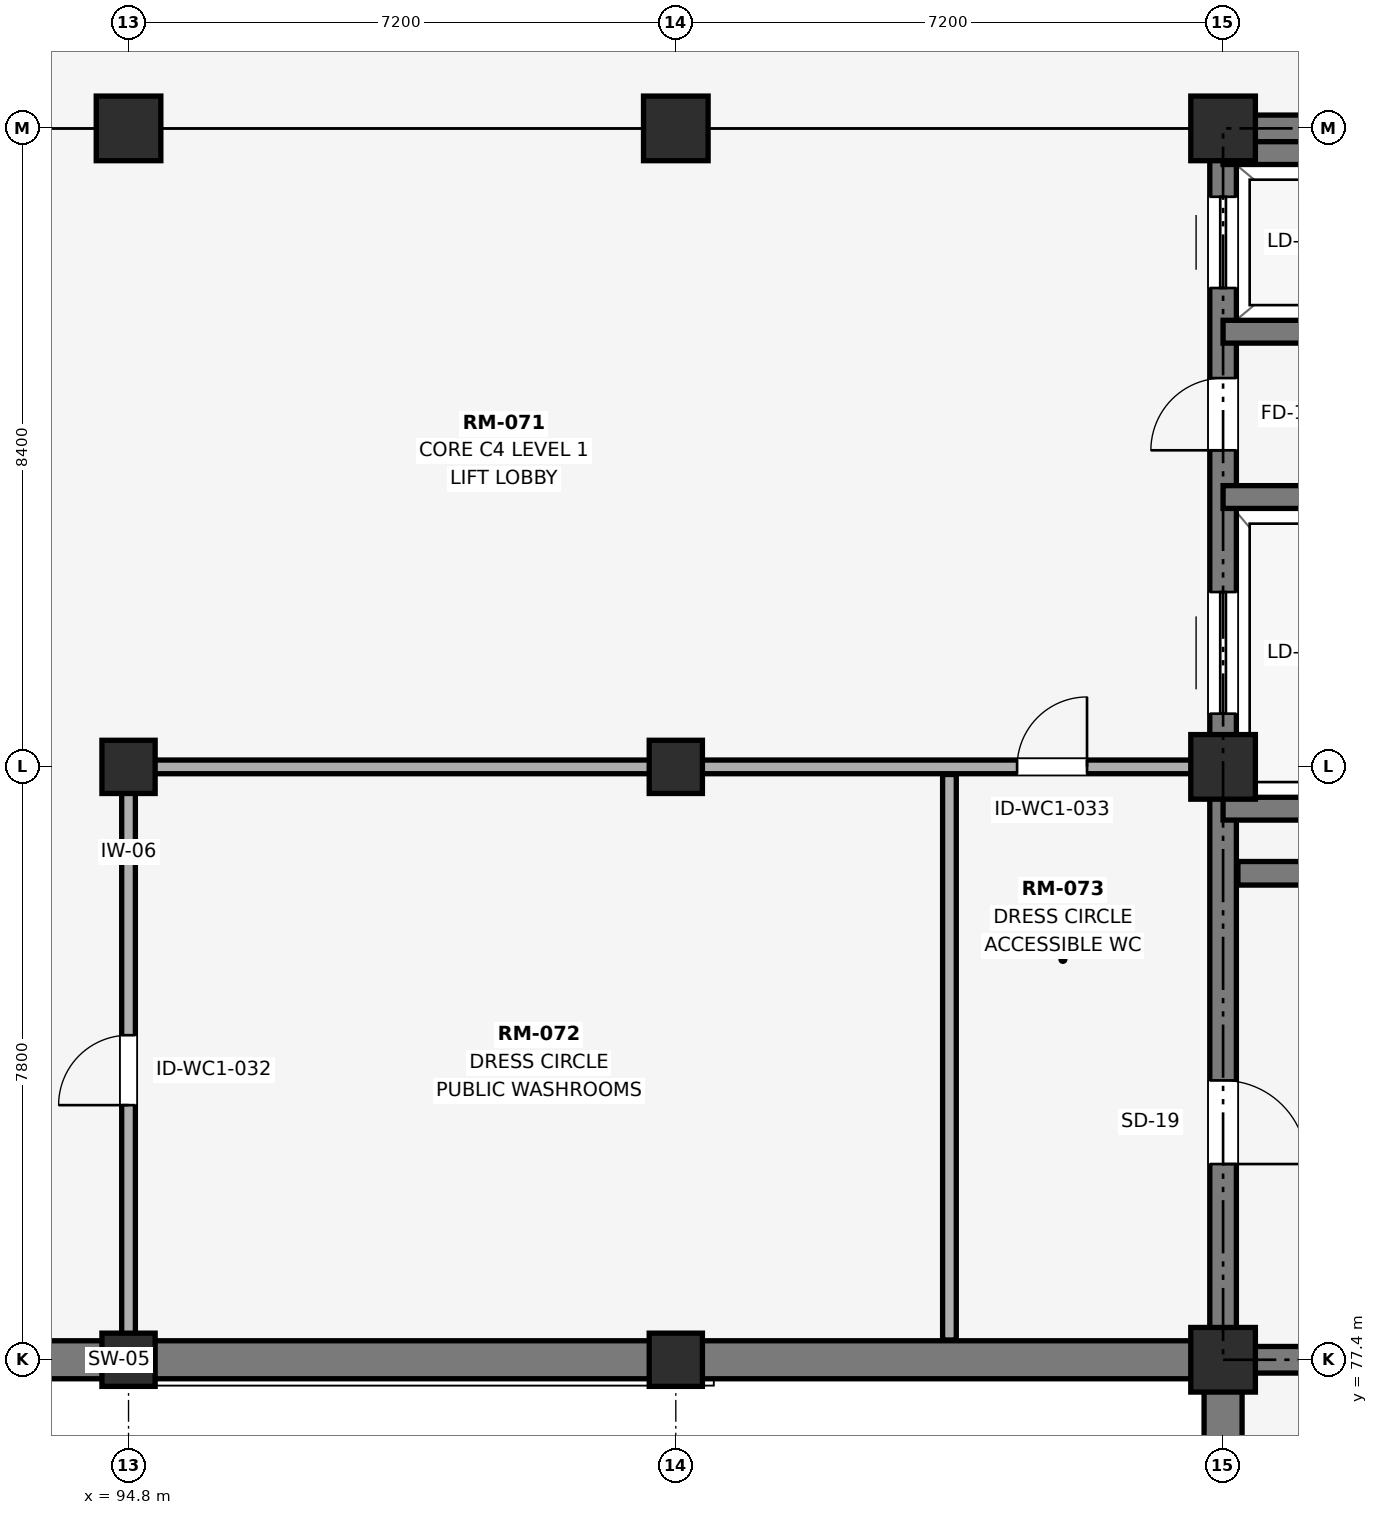
"""IFC4 building model, lengths in metres.
Left out: names, types, materials, properties, quantities, classifications, styles, units other than length and angle.
Written with IfcOpenShell. Run it as: python <this file> out.ifc"""

import sys

from ifc_helpers import new_model, si_unit, direction, frame, frame_2d, origin, origin_2d, place, context, subcontext, project, spatial, rectangle, extrude, element, fill, save


model = new_model("IFC4")
c1 = context("Model", 3, precision=1e-05, world=origin(), true_north=direction((0.0, 1.0)))
c2 = subcontext(c1, "Body", "Model", "MODEL_VIEW")
j1 = project(units=[si_unit("LENGTHUNIT", "METRE"), si_unit("PLANEANGLEUNIT", "RADIAN")], contexts=[c1])
p1 = place(None, origin())
s1 = spatial("IfcSite", under=j1, at=p1, CompositionType="ELEMENT")
p2 = place(p1, origin())
s2 = spatial("IfcBuilding", under=s1, at=p2, CompositionType="ELEMENT")
p3 = place(p2, frame((0.0, 0.0, 5.4)))
s3 = spatial("IfcBuildingStorey", under=s2, at=p3, CompositionType="ELEMENT", Elevation=5.4)
for number, where, z_axis, x_axis in (
    (1, (94.8, 77.4, 0.0), (0.0, 0.0, 1.0), (1.0, 0.0, 0.0)),
    (2, (94.8, 85.2, 0.0), (0.0, 0.0, 1.0), (1.0, 0.0, 0.0)),
):
    element("IfcColumn", number, at=place(p3, frame(where, z_axis=z_axis, x_axis=x_axis)), inside=s3, PredefinedType="COLUMN", context=c2, shape_type="SweptSolid", body=[
        extrude(rectangle(XDim=0.7, YDim=0.7, at=origin_2d()), origin(), (0.0, 0.0, 1.0), 4.8),
    ])
p4 = place(p3, frame((94.8, 93.6, 0.0), z_axis=(0.0, 0.0, 1.0), x_axis=(1.0, 0.0, 0.0)))
e3 = element("IfcColumn", 3, at=p4, inside=s3, PredefinedType="COLUMN", context=c2, shape_type="SweptSolid", body=[
    extrude(rectangle(XDim=0.85, YDim=0.85, at=origin_2d()), origin(), (0.0, 0.0, 1.0), 4.8),
])
for number, where, z_axis, x_axis in (
    (4, (102.0, 77.4, 0.0), (0.0, 0.0, 1.0), (1.0, 0.0, 0.0)),
    (5, (102.0, 85.2, 0.0), (0.0, 0.0, 1.0), (1.0, 0.0, 0.0)),
):
    element("IfcColumn", number, at=place(p3, frame(where, z_axis=z_axis, x_axis=x_axis)), inside=s3, PredefinedType="COLUMN", context=c2, shape_type="SweptSolid", body=[
        extrude(rectangle(XDim=0.7, YDim=0.7, at=origin_2d()), origin(), (0.0, 0.0, 1.0), 4.8),
    ])
for number, where, z_axis, x_axis in (
    (6, (102.0, 93.6, 0.0), (0.0, 0.0, 1.0), (1.0, 0.0, 0.0)),
    (7, (109.2, 77.4, 0.0), (0.0, 0.0, 1.0), (1.0, 0.0, 0.0)),
    (8, (109.2, 85.2, 0.0), (0.0, 0.0, 1.0), (1.0, 0.0, 0.0)),
    (9, (109.2, 93.6, 0.0), (0.0, 0.0, 1.0), (1.0, 0.0, 0.0)),
):
    element("IfcColumn", number, at=place(p3, frame(where, z_axis=z_axis, x_axis=x_axis)), inside=s3, PredefinedType="COLUMN", context=c2, shape_type="SweptSolid", body=[
        extrude(rectangle(XDim=0.85, YDim=0.85, at=origin_2d()), origin(), (0.0, 0.0, 1.0), 4.8),
    ])
p5 = place(p3, frame((58.59, 77.4, 0.0), z_axis=(0.0, 0.0, 1.0), x_axis=(1.0, 0.0, 0.0)))
e10 = element("IfcWall", 10, at=p5, inside=s3, PredefinedType="SOLIDWALL", context=c2, shape_type="SweptSolid", body=[
    extrude(rectangle(XDim=50.82, YDim=0.5, at=frame_2d((25.41, 0.0))), origin(), (0.0, 0.0, 1.0), 4.8),
])
p6 = place(p5, frame((17.0, 0.0, 0.0)))
e11 = element("IfcOpeningElement", 11, at=p6, cuts=e10, PredefinedType="OPENING", context=c2, shape_type="SweptSolid", body=[
    extrude(rectangle(XDim=2.0, YDim=2.45, at=frame_2d((1.0, 1.225))), frame((0.0, 0.26, 0.0), z_axis=(0.0, -1.0, 0.0), x_axis=(1.0, 0.0, 0.0)), (0.0, 0.0, 1.0), 0.52),
])
p7 = place(p3, frame((109.2, 46.41, 0.0), z_axis=(0.0, 0.0, 1.0), x_axis=(0.0, 1.0, 0.0)))
e12 = element("IfcWall", 12, at=p7, inside=s3, PredefinedType="SOLIDWALL", context=c2, shape_type="SweptSolid", body=[
    extrude(rectangle(XDim=30.78, YDim=0.5, at=frame_2d((15.39, 0.0))), origin(), (0.0, 0.0, 1.0), 4.8),
])
p8 = place(p3, frame((109.52, 77.4, 0.0), z_axis=(0.0, 0.0, 1.0), x_axis=(1.0, 0.0, 0.0)))
e13 = element("IfcWall", 13, at=p8, inside=s3, PredefinedType="SHEAR", context=c2, shape_type="SweptSolid", body=[
    extrude(rectangle(XDim=9.455, YDim=0.35, at=frame_2d((4.728, 0.0))), origin(), (0.0, 0.0, 1.0), 4.8),
])
p9 = place(p3, frame((109.025, 93.6, 0.0), z_axis=(0.0, 0.0, 1.0), x_axis=(1.0, 0.0, 0.0)))
e14 = element("IfcWall", 14, at=p9, inside=s3, PredefinedType="SHEAR", context=c2, shape_type="SweptSolid", body=[
    extrude(rectangle(XDim=9.95, YDim=0.35, at=frame_2d((4.975, 0.0))), origin(), (0.0, 0.0, 1.0), 4.8),
])
p10 = place(p3, frame((109.2, 77.575, 0.0), z_axis=(0.0, 0.0, 1.0), x_axis=(0.0, 1.0, 0.0)))
e15 = element("IfcWall", 15, at=p10, inside=s3, PredefinedType="SHEAR", context=c2, shape_type="SweptSolid", body=[
    extrude(rectangle(XDim=15.85, YDim=0.35, at=frame_2d((7.925, 0.0))), origin(), (0.0, 0.0, 1.0), 4.8),
])
p11 = place(p10, frame((8.325, 0.0, 0.0)))
e16 = element("IfcOpeningElement", 16, at=p11, cuts=e15, PredefinedType="OPENING", context=c2, shape_type="SweptSolid", body=[
    extrude(rectangle(XDim=1.6, YDim=2.4, at=frame_2d((0.8, 1.2))), frame((0.0, 0.185, 0.0), z_axis=(0.0, -1.0, 0.0), x_axis=(1.0, 0.0, 0.0)), (0.0, 0.0, 1.0), 0.37),
])
p12 = place(p10, frame((13.925, 0.0, 0.0)))
e17 = element("IfcOpeningElement", 17, at=p12, cuts=e15, PredefinedType="OPENING", context=c2, shape_type="SweptSolid", body=[
    extrude(rectangle(XDim=1.2, YDim=2.2, at=frame_2d((0.6, 1.1))), frame((0.0, 0.185, 0.0), z_axis=(0.0, -1.0, 0.0), x_axis=(1.0, 0.0, 0.0)), (0.0, 0.0, 1.0), 0.37),
])
p13 = place(p10, frame((11.79, 0.0, 0.0)))
e18 = element("IfcOpeningElement", 18, at=p13, cuts=e15, PredefinedType="OPENING", context=c2, shape_type="SweptSolid", body=[
    extrude(rectangle(XDim=0.95, YDim=2.1, at=frame_2d((0.475, 1.05))), frame((0.0, 0.185, 0.0), z_axis=(0.0, -1.0, 0.0), x_axis=(1.0, 0.0, 0.0)), (0.0, 0.0, 1.0), 0.37),
])
p14 = place(p10, frame((2.4, 0.0, 0.0)))
e19 = element("IfcOpeningElement", 19, at=p14, cuts=e15, PredefinedType="OPENING", context=c2, shape_type="SweptSolid", body=[
    extrude(rectangle(XDim=1.1, YDim=2.2, at=frame_2d((0.55, 1.1))), frame((0.0, 0.185, 0.0), z_axis=(0.0, -1.0, 0.0), x_axis=(1.0, 0.0, 0.0)), (0.0, 0.0, 1.0), 0.37),
])
p15 = place(p3, frame((109.395, 83.8, 0.0), z_axis=(0.0, 0.0, 1.0), x_axis=(1.0, 0.0, 0.0)))
e20 = element("IfcWall", 20, at=p15, inside=s3, PredefinedType="SHEAR", context=c2, shape_type="SweptSolid", body=[
    extrude(rectangle(XDim=9.21, YDim=0.31, at=frame_2d((4.605, 0.0))), origin(), (0.0, 0.0, 1.0), 4.8),
])
for number, where, z_axis, x_axis in (
    (21, (109.2, 84.65, 0.0), (0.0, 0.0, 1.0), (1.0, 0.0, 0.0)),
    (22, (109.2, 88.75, 0.0), (0.0, 0.0, 1.0), (1.0, 0.0, 0.0)),
):
    element("IfcWall", number, at=place(p3, frame(where, z_axis=z_axis, x_axis=x_axis)), inside=s3, PredefinedType="SHEAR", context=c2, shape_type="SweptSolid", body=[
        extrude(rectangle(XDim=3.5, YDim=0.3, at=frame_2d((1.75, 0.0))), origin(), (0.0, 0.0, 1.0), 4.8),
    ])
for number, where, z_axis, x_axis in (
    (23, (109.2, 90.925, 0.0), (0.0, 0.0, 1.0), (1.0, 0.0, 0.0)),
    (24, (109.2, 93.275, 0.0), (0.0, 0.0, 1.0), (1.0, 0.0, 0.0)),
):
    element("IfcWall", number, at=place(p3, frame(where, z_axis=z_axis, x_axis=x_axis)), inside=s3, PredefinedType="SHEAR", context=c2, shape_type="SweptSolid", body=[
        extrude(rectangle(XDim=2.8, YDim=0.3, at=frame_2d((1.4, 0.0))), origin(), (0.0, 0.0, 1.0), 4.8),
    ])
p16 = place(p3, frame((94.8, 77.55, 0.0), z_axis=(0.0, 0.0, 1.0), x_axis=(0.0, 1.0, 0.0)))
e25 = element("IfcWall", 25, at=p16, inside=s3, PredefinedType="PARTITIONING", context=c2, shape_type="SweptSolid", body=[
    extrude(rectangle(XDim=7.65, YDim=0.18, at=frame_2d((3.825, 0.0))), origin(), (0.0, 0.0, 1.0), 3.85),
])
p17 = place(p16, frame((3.2, 0.0, 0.0)))
e26 = element("IfcOpeningElement", 26, at=p17, cuts=e25, PredefinedType="OPENING", context=c2, shape_type="SweptSolid", body=[
    extrude(rectangle(XDim=0.92, YDim=2.15, at=frame_2d((0.46, 1.075))), frame((0.0, 0.1, 0.0), z_axis=(0.0, -1.0, 0.0), x_axis=(1.0, 0.0, 0.0)), (0.0, 0.0, 1.0), 0.2),
])
p18 = place(p3, frame((94.89, 85.2, 0.0), z_axis=(0.0, 0.0, 1.0), x_axis=(1.0, 0.0, 0.0)))
e27 = element("IfcWall", 27, at=p18, inside=s3, PredefinedType="PARTITIONING", context=c2, shape_type="SweptSolid", body=[
    extrude(rectangle(XDim=14.13, YDim=0.18, at=frame_2d((7.065, 0.0))), origin(), (0.0, 0.0, 1.0), 3.78),
])
p19 = place(p18, frame((11.6, 0.0, 0.0)))
e28 = element("IfcOpeningElement", 28, at=p19, cuts=e27, PredefinedType="OPENING", context=c2, shape_type="SweptSolid", body=[
    extrude(rectangle(XDim=0.92, YDim=2.15, at=frame_2d((0.46, 1.075))), frame((0.0, 0.1, 0.0), z_axis=(0.0, -1.0, 0.0), x_axis=(1.0, 0.0, 0.0)), (0.0, 0.0, 1.0), 0.2),
])
p20 = place(p3, frame((105.6, 77.66, 0.0), z_axis=(0.0, 0.0, 1.0), x_axis=(0.0, 1.0, 0.0)))
e29 = element("IfcWall", 29, at=p20, inside=s3, PredefinedType="PARTITIONING", context=c2, shape_type="SweptSolid", body=[
    extrude(rectangle(XDim=7.44, YDim=0.18, at=frame_2d((3.72, 0.0))), origin(), (0.0, 0.0, 1.0), 3.935),
])
p21 = place(p11, origin())
e30 = element("IfcDoor", 30, at=p21, inside=s3, OperationType="SLIDING_TO_LEFT", PredefinedType="DOOR", context=c2, shape_type="SweptSolid", body=[
    extrude(rectangle(XDim=1.6, YDim=2.4, at=frame_2d((0.8, 1.2))), frame((0.0, 0.025, 0.0), z_axis=(0.0, -1.0, 0.0), x_axis=(1.0, 0.0, 0.0)), (0.0, 0.0, 1.0), 0.05),
])
fill(e16, e30)
p22 = place(p12, origin())
e31 = element("IfcDoor", 31, at=p22, inside=s3, OperationType="SLIDING_TO_RIGHT", PredefinedType="DOOR", context=c2, shape_type="SweptSolid", body=[
    extrude(rectangle(XDim=1.2, YDim=2.2, at=frame_2d((0.6, 1.1))), frame((0.0, 0.025, 0.0), z_axis=(0.0, -1.0, 0.0), x_axis=(1.0, 0.0, 0.0)), (0.0, 0.0, 1.0), 0.05),
])
fill(e17, e31)
p23 = place(p13, origin())
e32 = element("IfcDoor", 32, at=p23, inside=s3, OperationType="SINGLE_SWING_LEFT", PredefinedType="DOOR", context=c2, shape_type="SweptSolid", body=[
    extrude(rectangle(XDim=0.95, YDim=2.1, at=frame_2d((0.475, 1.05))), frame((0.0, 0.025, 0.0), z_axis=(0.0, -1.0, 0.0), x_axis=(1.0, 0.0, 0.0)), (0.0, 0.0, 1.0), 0.05),
])
fill(e18, e32)
p24 = place(p14, frame((1.1, 0.0, 0.0), z_axis=(0.0, 0.0, 1.0), x_axis=(-1.0, 0.0, 0.0)))
e33 = element("IfcDoor", 33, at=p24, inside=s3, OperationType="SINGLE_SWING_LEFT", PredefinedType="DOOR", context=c2, shape_type="SweptSolid", body=[
    extrude(rectangle(XDim=1.1, YDim=2.2, at=frame_2d((0.55, 1.1))), frame((0.0, 0.025, 0.0), z_axis=(0.0, -1.0, 0.0), x_axis=(1.0, 0.0, 0.0)), (0.0, 0.0, 1.0), 0.05),
])
fill(e19, e33)
p25 = place(p17, origin())
e34 = element("IfcDoor", 34, at=p25, inside=s3, OperationType="SINGLE_SWING_LEFT", PredefinedType="DOOR", context=c2, shape_type="SweptSolid", body=[
    extrude(rectangle(XDim=0.92, YDim=2.15, at=frame_2d((0.46, 1.075))), frame((0.0, 0.025, 0.0), z_axis=(0.0, -1.0, 0.0), x_axis=(1.0, 0.0, 0.0)), (0.0, 0.0, 1.0), 0.05),
])
fill(e26, e34)
p26 = place(p19, origin())
e35 = element("IfcDoor", 35, at=p26, inside=s3, OperationType="SINGLE_SWING_RIGHT", PredefinedType="DOOR", context=c2, shape_type="SweptSolid", body=[
    extrude(rectangle(XDim=0.92, YDim=2.15, at=frame_2d((0.46, 1.075))), frame((0.0, 0.025, 0.0), z_axis=(0.0, -1.0, 0.0), x_axis=(1.0, 0.0, 0.0)), (0.0, 0.0, 1.0), 0.05),
])
fill(e28, e35)
save(model, sys.argv[1])
